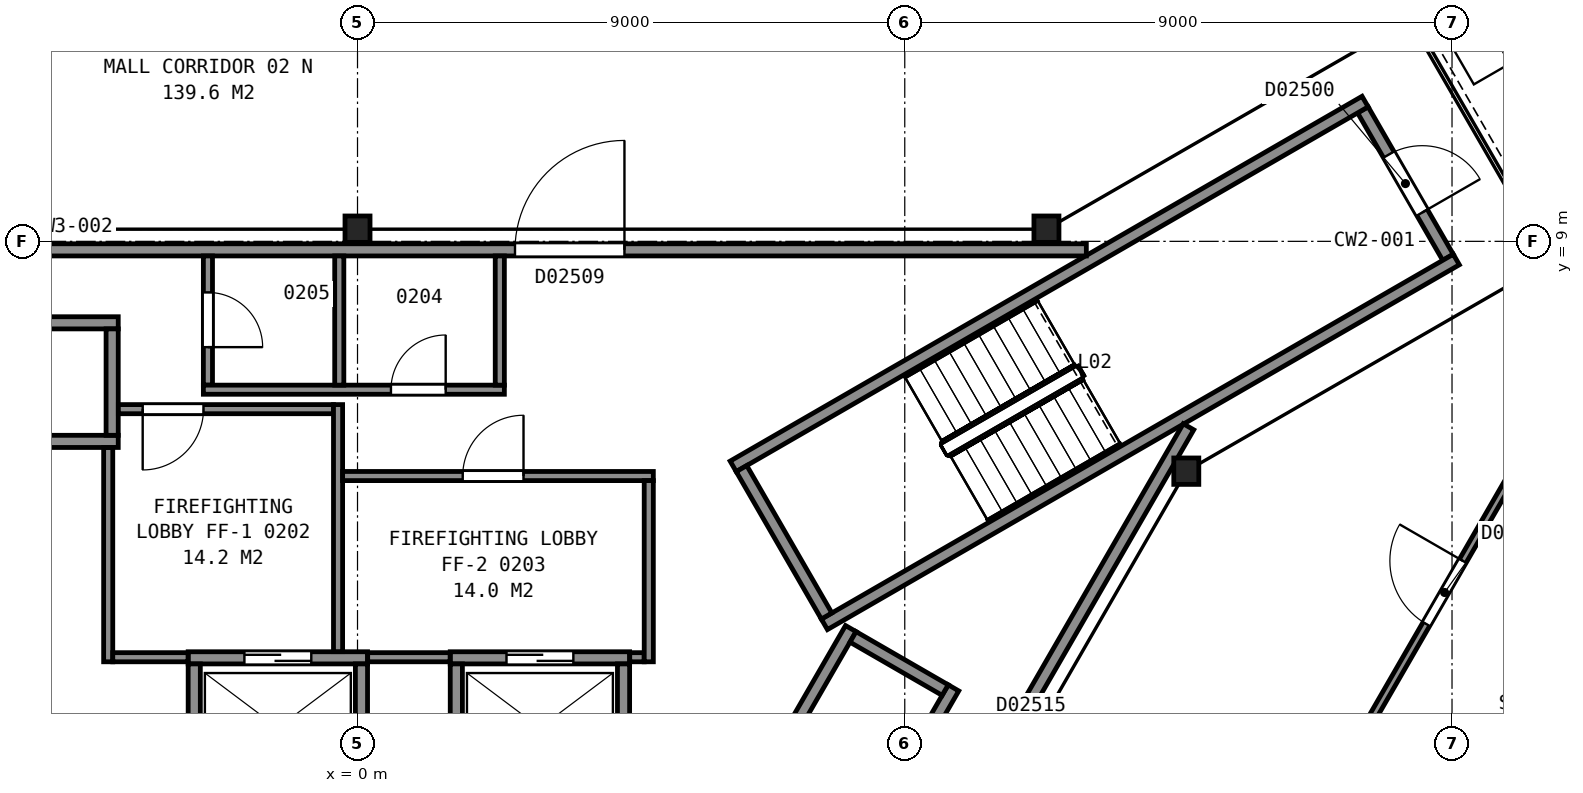
"""IFC4 building model, lengths in metres.
Left out: names, types, materials, properties, quantities, classifications, styles, units other than length and angle.
Written with IfcOpenShell. Run it as: python <this file> out.ifc"""

import sys

from ifc_helpers import new_model, si_unit, direction, frame, frame_2d, origin, origin_2d, place, context, subcontext, project, spatial, rectangle, i_section, extrude, element, fill, save


model = new_model("IFC4")
c1 = context("Model", 3, precision=1e-05, world=origin(), true_north=direction((0.0, 1.0)))
c2 = subcontext(c1, "Body", "Model", "MODEL_VIEW")
j1 = project(units=[si_unit("LENGTHUNIT", "METRE"), si_unit("PLANEANGLEUNIT", "RADIAN")], contexts=[c1])
p1 = place(None, origin())
s1 = spatial("IfcSite", under=j1, at=p1, CompositionType="ELEMENT")
p2 = place(p1, origin())
s2 = spatial("IfcBuilding", under=s1, at=p2, CompositionType="ELEMENT")
p3 = place(p2, frame((0.0, 0.0, 17.4)))
s3 = spatial("IfcBuildingStorey", under=s2, at=p3, CompositionType="ELEMENT", Elevation=17.4)
for number, where, z_axis, x_axis in (
    (1, (13.63, 5.22, 0.0), (0.0, 0.0, 1.0), (1.0, 0.0, 0.0)),
    (2, (11.33, 9.2, 0.0), (0.0, 0.0, 1.0), (1.0, 0.0, 0.0)),
    (3, (0.0, 9.2, 0.0), (0.0, 0.0, 1.0), (1.0, 0.0, 0.0)),
):
    element("IfcColumn", number, at=place(p3, frame(where, z_axis=z_axis, x_axis=x_axis)), inside=s3, PredefinedType="COLUMN", context=c2, shape_type="SweptSolid", body=[
        extrude(i_section(OverallWidth=0.411, OverallDepth=0.434, WebThickness=0.036, FlangeThickness=0.057, FilletRadius=0.015, at=origin_2d()), origin(), (0.0, 0.0, 1.0), 5.0),
    ])
p4 = place(p3, frame((17.934, 8.738, 0.0), z_axis=(0.0, 0.0, 1.0), x_axis=(-0.49998411664, 0.866034573852, 0.0)))
e4 = element("IfcWall", 4, at=p4, inside=s3, PredefinedType="PARTITIONING", context=c2, shape_type="SweptSolid", body=[
    extrude(rectangle(XDim=2.8, YDim=0.2, at=frame_2d((1.4, 0.0))), origin(), (0.0, 0.0, 1.0), 4.75),
])
p5 = place(p4, frame((0.85, 0.0, 0.0)))
e5 = element("IfcOpeningElement", 5, at=p5, cuts=e4, PredefinedType="OPENING", context=c2, shape_type="SweptSolid", body=[
    extrude(rectangle(XDim=1.1, YDim=2.1, at=frame_2d((0.55, 1.05))), frame((0.0, 0.11, 0.0), z_axis=(0.0, -1.0, 0.0), x_axis=(1.0, 0.0, 0.0)), (0.0, 0.0, 1.0), 0.22),
])
for number, where, z_axis, x_axis in (
    (6, (6.178, 5.299, 0.0), (0.0, 0.0, 1.0), (0.866, 0.5, 0.0)),
    (7, (7.678, 2.701, 0.0), (0.0, 0.0, 1.0), (0.866, 0.5, 0.0)),
):
    element("IfcWall", number, at=place(p3, frame(where, z_axis=z_axis, x_axis=x_axis)), inside=s3, PredefinedType="PARTITIONING", context=c2, shape_type="SweptSolid", body=[
        extrude(rectangle(XDim=12.0, YDim=0.2, at=frame_2d((6.0, 0.0))), origin(), (0.0, 0.0, 1.0), 4.75),
    ])
p6 = place(p3, frame((7.715, 2.838, 0.0), z_axis=(0.0, 0.0, 1.0), x_axis=(-0.500049511043, 0.865996816683, 0.0)))
e8 = element("IfcWall", 8, at=p6, inside=s3, PredefinedType="PARTITIONING", context=c2, shape_type="SweptSolid", body=[
    extrude(rectangle(XDim=2.8, YDim=0.2, at=frame_2d((1.4, 0.0))), origin(), (0.0, 0.0, 1.0), 4.75),
])
p7 = place(p3, frame((-2.785, 2.15, 0.0), z_axis=(0.0, 0.0, 1.0), x_axis=(1.0, 0.0, 0.0)))
e9 = element("IfcWall", 9, at=p7, inside=s3, PredefinedType="PARTITIONING", context=c2, shape_type="SweptSolid", body=[
    extrude(rectangle(XDim=2.95, YDim=0.2, at=frame_2d((1.475, 0.0))), origin(), (0.0, 0.0, 1.0), 5.0),
])
p8 = place(p7, frame((0.925, 0.0, 0.0)))
e10 = element("IfcOpeningElement", 10, at=p8, cuts=e9, PredefinedType="OPENING", context=c2, shape_type="SweptSolid", body=[
    extrude(rectangle(XDim=1.1, YDim=2.1, at=frame_2d((0.55, 1.05))), frame((0.0, 0.11, 0.0), z_axis=(0.0, -1.0, 0.0), x_axis=(1.0, 0.0, 0.0)), (0.0, 0.0, 1.0), 0.22),
])
p9 = place(p3, frame((1.525, 2.15, 0.0), z_axis=(0.0, 0.0, 1.0), x_axis=(1.0, 0.0, 0.0)))
e11 = element("IfcWall", 11, at=p9, inside=s3, PredefinedType="PARTITIONING", context=c2, shape_type="SweptSolid", body=[
    extrude(rectangle(XDim=2.95, YDim=0.2, at=frame_2d((1.475, 0.0))), origin(), (0.0, 0.0, 1.0), 5.0),
])
p10 = place(p9, frame((0.925, 0.0, 0.0)))
e12 = element("IfcOpeningElement", 12, at=p10, cuts=e11, PredefinedType="OPENING", context=c2, shape_type="SweptSolid", body=[
    extrude(rectangle(XDim=1.1, YDim=2.1, at=frame_2d((0.55, 1.05))), frame((0.0, 0.11, 0.0), z_axis=(0.0, -1.0, 0.0), x_axis=(1.0, 0.0, 0.0)), (0.0, 0.0, 1.0), 0.22),
])
for number, where, z_axis, x_axis in (
    (13, (-6.285, 5.71, 0.0), (0.0, 0.0, 1.0), (1.0, 0.0, 0.0)),
    (14, (-6.285, 7.66, 0.0), (0.0, 0.0, 1.0), (1.0, 0.0, 0.0)),
):
    element("IfcWall", number, at=place(p3, frame(where, z_axis=z_axis, x_axis=x_axis)), inside=s3, PredefinedType="PARTITIONING", context=c2, shape_type="SweptSolid", body=[
        extrude(rectangle(XDim=2.35, YDim=0.2, at=frame_2d((1.175, 0.0))), origin(), (0.0, 0.0, 1.0), 5.0),
    ])
p11 = place(p3, frame((7.351, -2.587, 0.0), z_axis=(0.0, 0.0, 1.0), x_axis=(0.500002801628, 0.866023786258, 0.0)))
e15 = element("IfcWall", 15, at=p11, inside=s3, PredefinedType="PARTITIONING", context=c2, shape_type="SweptSolid", body=[
    extrude(rectangle(XDim=4.9, YDim=0.2, at=frame_2d((2.45, 0.0))), origin(), (0.0, 0.0, 1.0), 5.0),
])
p12 = place(p3, frame((5.663, -1.612, 0.0), z_axis=(0.0, 0.0, 1.0), x_axis=(0.49998122708, 0.866036242063, 0.0)))
e16 = element("IfcWall", 16, at=p12, inside=s3, PredefinedType="PARTITIONING", context=c2, shape_type="SweptSolid", body=[
    extrude(rectangle(XDim=4.9, YDim=0.2, at=frame_2d((2.45, 0.0))), origin(), (0.0, 0.0, 1.0), 5.0),
])
for number, where, z_axis, x_axis in (
    (17, (4.375, 0.1, 0.0), (0.0, 0.0, 1.0), (0.0, 1.0, 0.0)),
    (18, (1.625, 0.1, 0.0), (0.0, 0.0, 1.0), (0.0, 1.0, 0.0)),
    (19, (0.065, 0.1, 0.0), (0.0, 0.0, 1.0), (0.0, 1.0, 0.0)),
    (20, (-2.685, 0.1, 0.0), (0.0, 0.0, 1.0), (0.0, 1.0, 0.0)),
):
    element("IfcWall", number, at=place(p3, frame(where, z_axis=z_axis, x_axis=x_axis)), inside=s3, PredefinedType="PARTITIONING", context=c2, shape_type="SweptSolid", body=[
        extrude(rectangle(XDim=1.95, YDim=0.2, at=frame_2d((0.975, 0.0))), origin(), (0.0, 0.0, 1.0), 5.0),
    ])
p13 = place(p3, frame((-4.035, 5.81, 0.0), z_axis=(0.0, 0.0, 1.0), x_axis=(0.0, 1.0, 0.0)))
e21 = element("IfcWall", 21, at=p13, inside=s3, PredefinedType="PARTITIONING", context=c2, shape_type="SweptSolid", body=[
    extrude(rectangle(XDim=1.75, YDim=0.2, at=frame_2d((0.875, 0.0))), origin(), (0.0, 0.0, 1.0), 5.0),
])
p14 = place(p3, frame((9.665, 1.62, 0.0), z_axis=(0.0, 0.0, 1.0), x_axis=(-0.866002029911, 0.500040482552, 0.0)))
e22 = element("IfcWall", 22, at=p14, inside=s3, PredefinedType="PARTITIONING", context=c2, shape_type="SweptSolid", body=[
    extrude(rectangle(XDim=1.75, YDim=0.2, at=frame_2d((0.875, 0.0))), origin(), (0.0, 0.0, 1.0), 5.0),
])
p15 = place(p3, frame((11.986, 8.86, 0.0), z_axis=(0.0, 0.0, 1.0), x_axis=(-1.0, 0.0, 0.0)))
e23 = element("IfcWall", 23, at=p15, inside=s3, PredefinedType="PARTITIONING", context=c2, shape_type="SweptSolid", body=[
    extrude(rectangle(XDim=23.967, YDim=0.2, at=frame_2d((11.983, 0.0))), origin(), (0.0, 0.0, 1.0), 4.75),
])
p16 = place(p15, frame((7.596, 0.0, 0.0)))
e24 = element("IfcOpeningElement", 24, at=p16, cuts=e23, PredefinedType="OPENING", context=c2, shape_type="SweptSolid", body=[
    extrude(rectangle(XDim=1.8, YDim=2.1, at=frame_2d((0.9, 1.05))), frame((0.0, 0.11, 0.0), z_axis=(0.0, -1.0, 0.0), x_axis=(1.0, 0.0, 0.0)), (0.0, 0.0, 1.0), 0.22),
])
p17 = place(p3, frame((-4.1, 2.085, 0.0), z_axis=(0.0, 0.0, 1.0), x_axis=(0.0, 1.0, 0.0)))
e25 = element("IfcWall", 25, at=p17, inside=s3, PredefinedType="PARTITIONING", context=c2, shape_type="SweptSolid", body=[
    extrude(rectangle(XDim=3.523, YDim=0.15, at=frame_2d((1.761, 0.0))), origin(), (0.0, 0.0, 1.0), 4.75),
])
p18 = place(p3, frame((-4.025, 2.16, 0.0), z_axis=(0.0, 0.0, 1.0), x_axis=(1.0, 0.0, 0.0)))
e26 = element("IfcWall", 26, at=p18, inside=s3, PredefinedType="PARTITIONING", context=c2, shape_type="SweptSolid", body=[
    extrude(rectangle(XDim=1.238, YDim=0.15, at=frame_2d((0.619, 0.0))), origin(), (0.0, 0.0, 1.0), 4.75),
])
p19 = place(p3, frame((-3.933, 6.24, 0.0), z_axis=(0.0, 0.0, 1.0), x_axis=(1.0, 0.0, 0.0)))
e27 = element("IfcWall", 27, at=p19, inside=s3, PredefinedType="PARTITIONING", context=c2, shape_type="SweptSolid", body=[
    extrude(rectangle(XDim=3.538, YDim=0.15, at=frame_2d((1.769, 0.0))), origin(), (0.0, 0.0, 1.0), 4.75),
])
p20 = place(p19, frame((0.4, 0.0, 0.0)))
e28 = element("IfcOpeningElement", 28, at=p20, cuts=e27, PredefinedType="OPENING", context=c2, shape_type="SweptSolid", body=[
    extrude(rectangle(XDim=1.0, YDim=2.1, at=frame_2d((0.5, 1.05))), frame((0.0, 0.085, 0.0), z_axis=(0.0, -1.0, 0.0), x_axis=(1.0, 0.0, 0.0)), (0.0, 0.0, 1.0), 0.17),
])
p21 = place(p3, frame((-2.46, 8.76, 0.0), z_axis=(0.0, 0.0, 1.0), x_axis=(0.0, -1.0, 0.0)))
e29 = element("IfcWall", 29, at=p21, inside=s3, PredefinedType="PARTITIONING", context=c2, shape_type="SweptSolid", body=[
    extrude(rectangle(XDim=2.125, YDim=0.15, at=frame_2d((1.062, 0.0))), origin(), (0.0, 0.0, 1.0), 4.75),
])
p22 = place(p21, frame((0.6, 0.0, 0.0)))
e30 = element("IfcOpeningElement", 30, at=p22, cuts=e29, PredefinedType="OPENING", context=c2, shape_type="SweptSolid", body=[
    extrude(rectangle(XDim=0.9, YDim=2.1, at=frame_2d((0.45, 1.05))), frame((0.0, 0.085, 0.0), z_axis=(0.0, -1.0, 0.0), x_axis=(1.0, 0.0, 0.0)), (0.0, 0.0, 1.0), 0.17),
])
p23 = place(p3, frame((-2.535, 6.56, 0.0), z_axis=(0.0, 0.0, 1.0), x_axis=(1.0, 0.0, 0.0)))
e31 = element("IfcWall", 31, at=p23, inside=s3, PredefinedType="PARTITIONING", context=c2, shape_type="SweptSolid", body=[
    extrude(rectangle(XDim=4.95, YDim=0.15, at=frame_2d((2.475, 0.0))), origin(), (0.0, 0.0, 1.0), 4.75),
])
p24 = place(p23, frame((3.085, 0.0, 0.0)))
e32 = element("IfcOpeningElement", 32, at=p24, cuts=e31, PredefinedType="OPENING", context=c2, shape_type="SweptSolid", body=[
    extrude(rectangle(XDim=0.9, YDim=2.1, at=frame_2d((0.45, 1.05))), frame((0.0, 0.085, 0.0), z_axis=(0.0, -1.0, 0.0), x_axis=(1.0, 0.0, 0.0)), (0.0, 0.0, 1.0), 0.17),
])
p25 = place(p3, frame((-0.32, 2.252, 0.0), z_axis=(0.0, 0.0, 1.0), x_axis=(0.0, 1.0, 0.0)))
e33 = element("IfcWall", 33, at=p25, inside=s3, PredefinedType="PARTITIONING", context=c2, shape_type="SweptSolid", body=[
    extrude(rectangle(XDim=4.063, YDim=0.15, at=frame_2d((2.031, 0.0))), origin(), (0.0, 0.0, 1.0), 4.75),
])
p26 = place(p3, frame((-0.245, 5.14, 0.0), z_axis=(0.0, 0.0, 1.0), x_axis=(1.0, 0.0, 0.0)))
e34 = element("IfcWall", 34, at=p26, inside=s3, PredefinedType="PARTITIONING", context=c2, shape_type="SweptSolid", body=[
    extrude(rectangle(XDim=5.11, YDim=0.15, at=frame_2d((2.555, 0.0))), origin(), (0.0, 0.0, 1.0), 4.75),
])
p27 = place(p26, frame((1.975, 0.0, 0.0)))
e35 = element("IfcOpeningElement", 35, at=p27, cuts=e34, PredefinedType="OPENING", context=c2, shape_type="SweptSolid", body=[
    extrude(rectangle(XDim=1.0, YDim=2.1, at=frame_2d((0.5, 1.05))), frame((0.0, 0.085, 0.0), z_axis=(0.0, -1.0, 0.0), x_axis=(1.0, 0.0, 0.0)), (0.0, 0.0, 1.0), 0.17),
])
p28 = place(p3, frame((-0.3, 6.635, 0.0), z_axis=(0.0, 0.0, 1.0), x_axis=(0.0, 1.0, 0.0)))
e36 = element("IfcWall", 36, at=p28, inside=s3, PredefinedType="PARTITIONING", context=c2, shape_type="SweptSolid", body=[
    extrude(rectangle(XDim=2.125, YDim=0.15, at=frame_2d((1.062, 0.0))), origin(), (0.0, 0.0, 1.0), 4.75),
])
p29 = place(p3, frame((0.167, 2.16, 0.0), z_axis=(0.0, 0.0, 1.0), x_axis=(1.0, 0.0, 0.0)))
e37 = element("IfcWall", 37, at=p29, inside=s3, PredefinedType="PARTITIONING", context=c2, shape_type="SweptSolid", body=[
    extrude(rectangle(XDim=1.356, YDim=0.15, at=frame_2d((0.678, 0.0))), origin(), (0.0, 0.0, 1.0), 4.75),
])
p30 = place(p3, frame((2.34, 6.635, 0.0), z_axis=(0.0, 0.0, 1.0), x_axis=(0.0, 1.0, 0.0)))
e38 = element("IfcWall", 38, at=p30, inside=s3, PredefinedType="PARTITIONING", context=c2, shape_type="SweptSolid", body=[
    extrude(rectangle(XDim=2.125, YDim=0.15, at=frame_2d((1.062, 0.0))), origin(), (0.0, 0.0, 1.0), 4.75),
])
p31 = place(p3, frame((3.703, -11.306, 0.0), z_axis=(0.0, 0.0, 1.0), x_axis=(0.500006692285, 0.866021539957, 0.0)))
e39 = element("IfcWall", 39, at=p31, inside=s3, PredefinedType="PARTITIONING", context=c2, shape_type="SweptSolid", body=[
    extrude(rectangle(XDim=19.926, YDim=0.2, at=frame_2d((9.963, 0.0))), origin(), (0.0, 0.0, 1.0), 4.75),
])
p32 = place(p31, frame((9.4, 0.0, 0.0)))
e40 = element("IfcOpeningElement", 40, at=p32, cuts=e39, PredefinedType="OPENING", context=c2, shape_type="SweptSolid", body=[
    extrude(rectangle(XDim=1.8, YDim=2.1, at=frame_2d((0.9, 1.05))), frame((0.0, 0.11, 0.0), z_axis=(0.0, -1.0, 0.0), x_axis=(1.0, 0.0, 0.0)), (0.0, 0.0, 1.0), 0.22),
])
p33 = place(p3, frame((4.477, 2.16, 0.0), z_axis=(0.0, 0.0, 1.0), x_axis=(1.0, 0.0, 0.0)))
e41 = element("IfcWall", 41, at=p33, inside=s3, PredefinedType="PARTITIONING", context=c2, shape_type="SweptSolid", body=[
    extrude(rectangle(XDim=0.238, YDim=0.15, at=frame_2d((0.119, 0.0))), origin(), (0.0, 0.0, 1.0), 4.75),
])
p34 = place(p3, frame((4.79, 2.085, 0.0), z_axis=(0.0, 0.0, 1.0), x_axis=(0.0, 1.0, 0.0)))
e42 = element("IfcWall", 42, at=p34, inside=s3, PredefinedType="PARTITIONING", context=c2, shape_type="SweptSolid", body=[
    extrude(rectangle(XDim=2.98, YDim=0.15, at=frame_2d((1.49, 0.0))), origin(), (0.0, 0.0, 1.0), 4.75),
])
p35 = place(p3, frame((-4.438, -20.054, 0.0), z_axis=(0.0, 0.0, 1.0), x_axis=(-0.499994028088, 0.866028851642, 0.0)))
e43 = element("IfcWall", 43, at=p35, inside=s3, PredefinedType="PARTITIONING", context=c2, shape_type="SweptSolid", body=[
    extrude(rectangle(XDim=30.297, YDim=0.125, at=frame_2d((15.148, 0.0))), origin(), (0.0, 0.0, 1.0), 3.853),
])
p36 = place(p35, frame((10.349, 0.0, 0.0)))
e44 = element("IfcOpeningElement", 44, at=p36, cuts=e43, PredefinedType="OPENING", context=c2, shape_type="SweptSolid", body=[
    extrude(rectangle(XDim=1.2, YDim=2.1, at=frame_2d((0.6, 1.05))), frame((0.0, 0.073, 0.0), z_axis=(0.0, -1.0, 0.0), x_axis=(1.0, 0.0, 0.0)), (0.0, 0.0, 1.0), 0.145),
])
p37 = place(p35, frame((2.916, 0.0, 0.0)))
e45 = element("IfcOpeningElement", 45, at=p37, cuts=e43, PredefinedType="OPENING", context=c2, shape_type="SweptSolid", body=[
    extrude(rectangle(XDim=1.0, YDim=2.1, at=frame_2d((0.5, 1.05))), frame((0.0, 0.073, 0.0), z_axis=(0.0, -1.0, 0.0), x_axis=(1.0, 0.0, 0.0)), (0.0, 0.0, 1.0), 0.145),
])
p38 = place(p3, frame((19.586, 6.184, 0.0), z_axis=(0.0, 0.0, 1.0), x_axis=(-0.499994028088, -0.866028851642, 0.0)))
e46 = element("IfcWall", 46, at=p38, inside=s3, PredefinedType="PARTITIONING", context=c2, shape_type="SweptSolid", body=[
    extrude(rectangle(XDim=30.297, YDim=0.125, at=frame_2d((15.148, 0.0))), origin(), (0.0, 0.0, 1.0), 3.853),
])
p39 = place(p38, frame((26.285, 0.0, 0.0)))
e47 = element("IfcOpeningElement", 47, at=p39, cuts=e46, PredefinedType="OPENING", context=c2, shape_type="SweptSolid", body=[
    extrude(rectangle(XDim=1.2, YDim=2.1, at=frame_2d((0.6, 1.05))), frame((0.0, 0.073, 0.0), z_axis=(0.0, -1.0, 0.0), x_axis=(1.0, 0.0, 0.0)), (0.0, 0.0, 1.0), 0.145),
])
p40 = place(p38, frame((18.832, 0.0, 0.0)))
e48 = element("IfcOpeningElement", 48, at=p40, cuts=e46, PredefinedType="OPENING", context=c2, shape_type="SweptSolid", body=[
    extrude(rectangle(XDim=1.0, YDim=2.1, at=frame_2d((0.5, 1.05))), frame((0.0, 0.073, 0.0), z_axis=(0.0, -1.0, 0.0), x_axis=(1.0, 0.0, 0.0)), (0.0, 0.0, 1.0), 0.145),
])
p41 = place(p38, frame((10.349, 0.0, 0.0)))
e49 = element("IfcOpeningElement", 49, at=p41, cuts=e46, PredefinedType="OPENING", context=c2, shape_type="SweptSolid", body=[
    extrude(rectangle(XDim=1.2, YDim=2.1, at=frame_2d((0.6, 1.05))), frame((0.0, 0.073, 0.0), z_axis=(0.0, -1.0, 0.0), x_axis=(1.0, 0.0, 0.0)), (0.0, 0.0, 1.0), 0.145),
])
p42 = place(p38, frame((2.817, 0.0, 0.0)))
e50 = element("IfcOpeningElement", 50, at=p42, cuts=e46, PredefinedType="OPENING", context=c2, shape_type="SweptSolid", body=[
    extrude(rectangle(XDim=1.2, YDim=2.1, at=frame_2d((0.6, 1.05))), frame((0.0, 0.073, 0.0), z_axis=(0.0, -1.0, 0.0), x_axis=(1.0, 0.0, 0.0)), (0.0, 0.0, 1.0), 0.145),
])
p43 = place(p5, origin())
e51 = element("IfcDoor", 51, at=p43, inside=s3, OperationType="SINGLE_SWING_LEFT", PredefinedType="DOOR", context=c2, shape_type="SweptSolid", body=[
    extrude(rectangle(XDim=1.1, YDim=2.1, at=frame_2d((0.55, 1.05))), frame((0.0, 0.025, 0.0), z_axis=(0.0, -1.0, 0.0), x_axis=(1.0, 0.0, 0.0)), (0.0, 0.0, 1.0), 0.05),
])
fill(e5, e51)
p44 = place(p8, origin())
e52 = element("IfcDoor", 52, at=p44, inside=s3, OperationType="SLIDING_TO_LEFT", PredefinedType="DOOR", context=c2, shape_type="SweptSolid", body=[
    extrude(rectangle(XDim=1.1, YDim=2.1, at=frame_2d((0.55, 1.05))), frame((0.0, 0.025, 0.0), z_axis=(0.0, -1.0, 0.0), x_axis=(1.0, 0.0, 0.0)), (0.0, 0.0, 1.0), 0.05),
])
fill(e10, e52)
p45 = place(p10, origin())
e53 = element("IfcDoor", 53, at=p45, inside=s3, OperationType="SLIDING_TO_RIGHT", PredefinedType="DOOR", context=c2, shape_type="SweptSolid", body=[
    extrude(rectangle(XDim=1.1, YDim=2.1, at=frame_2d((0.55, 1.05))), frame((0.0, 0.025, 0.0), z_axis=(0.0, -1.0, 0.0), x_axis=(1.0, 0.0, 0.0)), (0.0, 0.0, 1.0), 0.05),
])
fill(e12, e53)
p46 = place(p16, origin())
e54 = element("IfcDoor", 54, at=p46, inside=s3, OperationType="DOUBLE_DOOR_SINGLE_SWING", PredefinedType="DOOR", context=c2, shape_type="SweptSolid", body=[
    extrude(rectangle(XDim=1.8, YDim=2.1, at=frame_2d((0.9, 1.05))), frame((0.0, 0.025, 0.0), z_axis=(0.0, -1.0, 0.0), x_axis=(1.0, 0.0, 0.0)), (0.0, 0.0, 1.0), 0.05),
])
fill(e24, e54)
p47 = place(p20, origin())
e55 = element("IfcDoor", 55, at=p47, inside=s3, OperationType="SINGLE_SWING_LEFT", PredefinedType="DOOR", context=c2, shape_type="SweptSolid", body=[
    extrude(rectangle(XDim=1.0, YDim=2.1, at=frame_2d((0.5, 1.05))), frame((0.0, 0.025, 0.0), z_axis=(0.0, -1.0, 0.0), x_axis=(1.0, 0.0, 0.0)), (0.0, 0.0, 1.0), 0.05),
])
fill(e28, e55)
p48 = place(p22, origin())
e56 = element("IfcDoor", 56, at=p48, inside=s3, OperationType="SINGLE_SWING_RIGHT", PredefinedType="DOOR", context=c2, shape_type="SweptSolid", body=[
    extrude(rectangle(XDim=0.9, YDim=2.1, at=frame_2d((0.45, 1.05))), frame((0.0, 0.025, 0.0), z_axis=(0.0, -1.0, 0.0), x_axis=(1.0, 0.0, 0.0)), (0.0, 0.0, 1.0), 0.05),
])
fill(e30, e56)
p49 = place(p24, origin())
e57 = element("IfcDoor", 57, at=p49, inside=s3, OperationType="SINGLE_SWING_RIGHT", PredefinedType="DOOR", context=c2, shape_type="SweptSolid", body=[
    extrude(rectangle(XDim=0.9, YDim=2.1, at=frame_2d((0.45, 1.05))), frame((0.0, 0.025, 0.0), z_axis=(0.0, -1.0, 0.0), x_axis=(1.0, 0.0, 0.0)), (0.0, 0.0, 1.0), 0.05),
])
fill(e32, e57)
p50 = place(p27, origin())
e58 = element("IfcDoor", 58, at=p50, inside=s3, OperationType="SINGLE_SWING_RIGHT", PredefinedType="DOOR", context=c2, shape_type="SweptSolid", body=[
    extrude(rectangle(XDim=1.0, YDim=2.1, at=frame_2d((0.5, 1.05))), frame((0.0, 0.025, 0.0), z_axis=(0.0, -1.0, 0.0), x_axis=(1.0, 0.0, 0.0)), (0.0, 0.0, 1.0), 0.05),
])
fill(e35, e58)
p51 = place(p42, origin())
e59 = element("IfcDoor", 59, at=p51, inside=s3, OperationType="SINGLE_SWING_LEFT", PredefinedType="DOOR", context=c2, shape_type="SweptSolid", body=[
    extrude(rectangle(XDim=1.2, YDim=2.1, at=frame_2d((0.6, 1.05))), frame((0.0, 0.025, 0.0), z_axis=(0.0, -1.0, 0.0), x_axis=(1.0, 0.0, 0.0)), (0.0, 0.0, 1.0), 0.05),
])
fill(e50, e59)
save(model, sys.argv[1])
